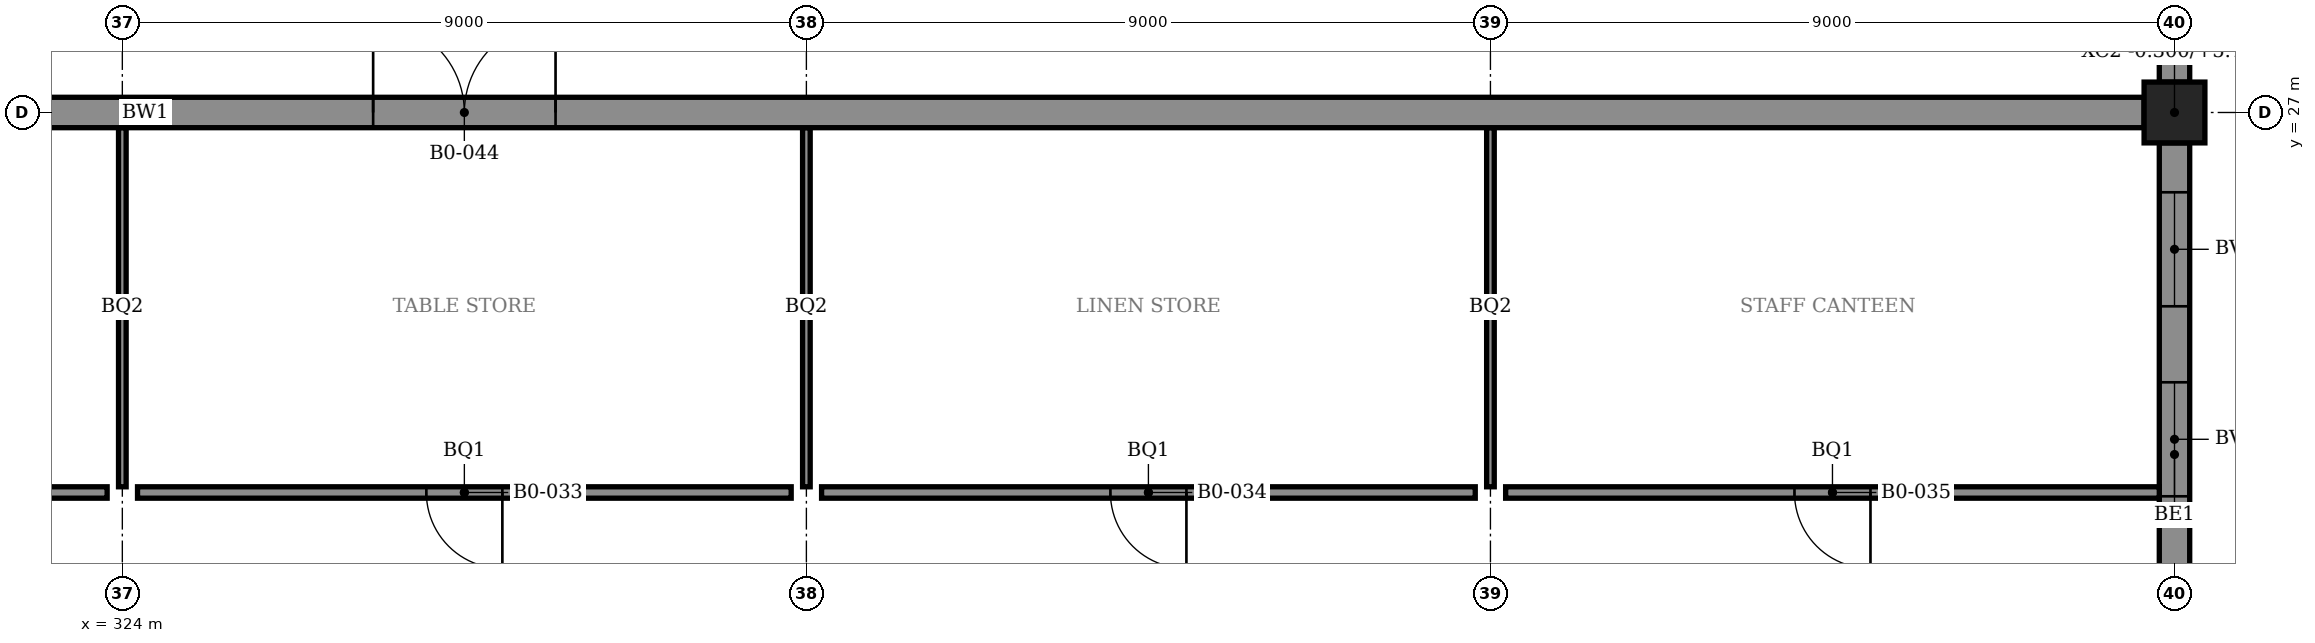
"""IFC4 building model, lengths in metres.
Left out: names, types, materials, properties, quantities, classifications, styles, units other than length and angle.
Written with IfcOpenShell. Run it as: python <this file> out.ifc"""

import sys

from ifc_helpers import new_model, si_unit, direction, frame, frame_2d, origin, origin_2d, place, context, subcontext, project, spatial, polyline, rectangle, outline, extrude, element, fill, save


model = new_model("IFC4")
c1 = context("Model", 3, precision=1e-05, world=origin(), true_north=direction((0.0, 1.0)))
c2 = subcontext(c1, "Body", "Model", "MODEL_VIEW")
j1 = project(units=[si_unit("LENGTHUNIT", "METRE"), si_unit("PLANEANGLEUNIT", "RADIAN")], contexts=[c1])
p1 = place(None, origin())
s1 = spatial("IfcSite", under=j1, at=p1, CompositionType="ELEMENT")
p2 = place(p1, origin())
s2 = spatial("IfcBuilding", under=s1, at=p2, CompositionType="ELEMENT")
p3 = place(p2, origin())
s3 = spatial("IfcBuildingStorey", under=s2, at=p3, CompositionType="ELEMENT", Elevation=0.0)
p4 = place(p3, frame((351.0, 27.0, -0.3), z_axis=(0.0, 0.0, 1.0), x_axis=(1.0, 0.0, 0.0)))
e1 = element("IfcColumn", 1, at=p4, inside=s3, PredefinedType="COLUMN", context=c2, shape_type="SweptSolid", body=[
    extrude(rectangle(XDim=0.8, YDim=0.8, at=origin_2d()), origin(), (0.0, 0.0, 1.0), 6.02),
])
p5 = place(p3, frame((288.4, 27.0, -0.3), z_axis=(0.0, 0.0, 1.0), x_axis=(1.0, 0.0, 0.0)))
e2 = element("IfcWall", 2, at=p5, inside=s3, PredefinedType="SHEAR", context=c2, shape_type="SweptSolid", body=[
    extrude(rectangle(XDim=62.2, YDim=0.4, at=frame_2d((31.1, 0.0))), origin(), (0.0, 0.0, 1.0), 10.625),
])
p6 = place(p5, frame((22.4, 0.0, 0.3)))
e3 = element("IfcOpeningElement", 3, at=p6, cuts=e2, PredefinedType="OPENING", context=c2, shape_type="SweptSolid", body=[
    extrude(rectangle(XDim=2.4, YDim=2.4, at=frame_2d((1.2, 1.2))), frame((0.0, 0.21, 0.0), z_axis=(0.0, -1.0, 0.0), x_axis=(1.0, 0.0, 0.0)), (0.0, 0.0, 1.0), 0.42),
])
p7 = place(p5, frame((38.9, 0.0, 0.3)))
e4 = element("IfcOpeningElement", 4, at=p7, cuts=e2, PredefinedType="OPENING", context=c2, shape_type="SweptSolid", body=[
    extrude(rectangle(XDim=2.4, YDim=2.4, at=frame_2d((1.2, 1.2))), frame((0.0, 0.21, 0.0), z_axis=(0.0, -1.0, 0.0), x_axis=(1.0, 0.0, 0.0)), (0.0, 0.0, 1.0), 0.42),
])
p8 = place(p3, frame((351.0, 27.4, 0.0), z_axis=(0.0, 0.0, 1.0), x_axis=(0.0, 1.0, 0.0)))
e5 = element("IfcWall", 5, at=p8, inside=s3, PredefinedType="STANDARD", context=c2, shape_type="SweptSolid", body=[
    extrude(outline(polyline([(0.0, 0.0), (35.2, 0.0), (35.2, 9.75), (35.5, 9.75), (35.5, 17.708), (0.0, 11.448), (0.0, 0.0)])), frame((0.0, 0.2, 0.0), z_axis=(0.0, -1.0, 0.0), x_axis=(1.0, 0.0, 0.0)), (0.0, 0.0, 1.0), 0.4),
])
p9 = place(p8, frame((2.75, 0.0, 0.0)))
e6 = element("IfcOpeningElement", 6, at=p9, cuts=e5, PredefinedType="OPENING", context=c2, shape_type="SweptSolid", body=[
    extrude(rectangle(XDim=2.7, YDim=2.4, at=frame_2d((1.35, 1.2))), frame((0.0, 0.21, 0.0), z_axis=(0.0, -1.0, 0.0), x_axis=(1.0, 0.0, 0.0)), (0.0, 0.0, 1.0), 0.42),
])
p10 = place(p8, frame((11.75, 0.0, 0.0)))
e7 = element("IfcOpeningElement", 7, at=p10, cuts=e5, PredefinedType="OPENING", context=c2, shape_type="SweptSolid", body=[
    extrude(rectangle(XDim=2.7, YDim=2.4, at=frame_2d((1.35, 1.2))), frame((0.0, 0.21, 0.0), z_axis=(0.0, -1.0, 0.0), x_axis=(1.0, 0.0, 0.0)), (0.0, 0.0, 1.0), 0.42),
])
p11 = place(p8, frame((20.75, 0.0, 0.0)))
e8 = element("IfcOpeningElement", 8, at=p11, cuts=e5, PredefinedType="OPENING", context=c2, shape_type="SweptSolid", body=[
    extrude(rectangle(XDim=2.7, YDim=2.4, at=frame_2d((1.35, 1.2))), frame((0.0, 0.21, 0.0), z_axis=(0.0, -1.0, 0.0), x_axis=(1.0, 0.0, 0.0)), (0.0, 0.0, 1.0), 0.42),
])
p12 = place(p8, frame((29.75, 0.0, 0.0)))
e9 = element("IfcOpeningElement", 9, at=p12, cuts=e5, PredefinedType="OPENING", context=c2, shape_type="SweptSolid", body=[
    extrude(rectangle(XDim=2.7, YDim=2.4, at=frame_2d((1.35, 1.2))), frame((0.0, 0.21, 0.0), z_axis=(0.0, -1.0, 0.0), x_axis=(1.0, 0.0, 0.0)), (0.0, 0.0, 1.0), 0.42),
])
p13 = place(p3, frame((351.0, 18.4, 0.0), z_axis=(0.0, 0.0, 1.0), x_axis=(0.0, 1.0, 0.0)))
e10 = element("IfcWall", 10, at=p13, inside=s3, PredefinedType="STANDARD", context=c2, shape_type="SweptSolid", body=[
    extrude(rectangle(XDim=8.2, YDim=0.4, at=frame_2d((4.1, 0.0))), origin(), (0.0, 0.0, 1.0), 5.02),
])
p14 = place(p13, frame((1.05, 0.0, 0.9)))
e11 = element("IfcOpeningElement", 11, at=p14, cuts=e10, PredefinedType="OPENING", context=c2, shape_type="SweptSolid", body=[
    extrude(rectangle(XDim=1.5, YDim=1.8, at=frame_2d((0.75, 0.9))), frame((0.0, 0.21, 0.0), z_axis=(0.0, -1.0, 0.0), x_axis=(1.0, 0.0, 0.0)), (0.0, 0.0, 1.0), 0.42),
])
p15 = place(p13, frame((3.55, 0.0, 0.9)))
e12 = element("IfcOpeningElement", 12, at=p15, cuts=e10, PredefinedType="OPENING", context=c2, shape_type="SweptSolid", body=[
    extrude(rectangle(XDim=1.5, YDim=1.8, at=frame_2d((0.75, 0.9))), frame((0.0, 0.21, 0.0), z_axis=(0.0, -1.0, 0.0), x_axis=(1.0, 0.0, 0.0)), (0.0, 0.0, 1.0), 0.42),
])
p16 = place(p13, frame((6.05, 0.0, 0.9)))
e13 = element("IfcOpeningElement", 13, at=p16, cuts=e10, PredefinedType="OPENING", context=c2, shape_type="SweptSolid", body=[
    extrude(rectangle(XDim=1.5, YDim=1.8, at=frame_2d((0.75, 0.9))), frame((0.0, 0.21, 0.0), z_axis=(0.0, -1.0, 0.0), x_axis=(1.0, 0.0, 0.0)), (0.0, 0.0, 1.0), 0.42),
])
p17 = place(p3, frame((315.2, 22.0, 0.0), z_axis=(0.0, 0.0, 1.0), x_axis=(1.0, 0.0, 0.0)))
e14 = element("IfcWall", 14, at=p17, inside=s3, PredefinedType="PARTITIONING", context=c2, shape_type="SweptSolid", body=[
    extrude(rectangle(XDim=8.6, YDim=0.15, at=frame_2d((4.3, 0.0))), origin(), (0.0, 0.0, 1.0), 5.72),
])
p18 = place(p3, frame((324.2, 22.0, 0.0), z_axis=(0.0, 0.0, 1.0), x_axis=(1.0, 0.0, 0.0)))
e15 = element("IfcWall", 15, at=p18, inside=s3, PredefinedType="PARTITIONING", context=c2, shape_type="SweptSolid", body=[
    extrude(rectangle(XDim=8.6, YDim=0.15, at=frame_2d((4.3, 0.0))), origin(), (0.0, 0.0, 1.0), 5.72),
])
p19 = place(p18, frame((3.8, 0.0, 0.0)))
e16 = element("IfcOpeningElement", 16, at=p19, cuts=e15, PredefinedType="OPENING", context=c2, shape_type="SweptSolid", body=[
    extrude(rectangle(XDim=1.0, YDim=2.4, at=frame_2d((0.5, 1.2))), frame((0.0, 0.085, 0.0), z_axis=(0.0, -1.0, 0.0), x_axis=(1.0, 0.0, 0.0)), (0.0, 0.0, 1.0), 0.17),
])
p20 = place(p3, frame((333.2, 22.0, 0.0), z_axis=(0.0, 0.0, 1.0), x_axis=(1.0, 0.0, 0.0)))
e17 = element("IfcWall", 17, at=p20, inside=s3, PredefinedType="PARTITIONING", context=c2, shape_type="SweptSolid", body=[
    extrude(rectangle(XDim=8.6, YDim=0.15, at=frame_2d((4.3, 0.0))), origin(), (0.0, 0.0, 1.0), 5.72),
])
p21 = place(p20, frame((3.8, 0.0, 0.0)))
e18 = element("IfcOpeningElement", 18, at=p21, cuts=e17, PredefinedType="OPENING", context=c2, shape_type="SweptSolid", body=[
    extrude(rectangle(XDim=1.0, YDim=2.4, at=frame_2d((0.5, 1.2))), frame((0.0, 0.085, 0.0), z_axis=(0.0, -1.0, 0.0), x_axis=(1.0, 0.0, 0.0)), (0.0, 0.0, 1.0), 0.17),
])
p22 = place(p3, frame((342.2, 22.0, 0.0), z_axis=(0.0, 0.0, 1.0), x_axis=(1.0, 0.0, 0.0)))
e19 = element("IfcWall", 19, at=p22, inside=s3, PredefinedType="PARTITIONING", context=c2, shape_type="SweptSolid", body=[
    extrude(rectangle(XDim=8.6, YDim=0.15, at=frame_2d((4.3, 0.0))), origin(), (0.0, 0.0, 1.0), 5.72),
])
p23 = place(p22, frame((3.8, 0.0, 0.0)))
e20 = element("IfcOpeningElement", 20, at=p23, cuts=e19, PredefinedType="OPENING", context=c2, shape_type="SweptSolid", body=[
    extrude(rectangle(XDim=1.0, YDim=2.4, at=frame_2d((0.5, 1.2))), frame((0.0, 0.085, 0.0), z_axis=(0.0, -1.0, 0.0), x_axis=(1.0, 0.0, 0.0)), (0.0, 0.0, 1.0), 0.17),
])
for number, where, z_axis, x_axis in (
    (21, (324.0, 22.075, 0.0), (0.0, 0.0, 1.0), (0.0, 1.0, 0.0)),
    (22, (333.0, 22.075, 0.0), (0.0, 0.0, 1.0), (0.0, 1.0, 0.0)),
    (23, (342.0, 22.075, 0.0), (0.0, 0.0, 1.0), (0.0, 1.0, 0.0)),
):
    element("IfcWall", number, at=place(p3, frame(where, z_axis=z_axis, x_axis=x_axis)), inside=s3, PredefinedType="PARTITIONING", context=c2, shape_type="SweptSolid", body=[
        extrude(rectangle(XDim=4.725, YDim=0.1, at=frame_2d((2.363, 0.0))), origin(), (0.0, 0.0, 1.0), 5.02),
    ])
p24 = place(p15, origin())
e24 = element("IfcWindow", 24, at=p24, inside=s3, PartitioningType="SINGLE_PANEL", PredefinedType="WINDOW", context=c2, shape_type="SweptSolid", body=[
    extrude(rectangle(XDim=1.5, YDim=1.8, at=frame_2d((0.75, 0.9))), frame((0.0, 0.03, 0.0), z_axis=(0.0, -1.0, 0.0), x_axis=(1.0, 0.0, 0.0)), (0.0, 0.0, 1.0), 0.06),
])
fill(e12, e24)
p25 = place(p16, origin())
e25 = element("IfcWindow", 25, at=p25, inside=s3, PartitioningType="SINGLE_PANEL", PredefinedType="WINDOW", context=c2, shape_type="SweptSolid", body=[
    extrude(rectangle(XDim=1.5, YDim=1.8, at=frame_2d((0.75, 0.9))), frame((0.0, 0.03, 0.0), z_axis=(0.0, -1.0, 0.0), x_axis=(1.0, 0.0, 0.0)), (0.0, 0.0, 1.0), 0.06),
])
fill(e13, e25)
p26 = place(p19, frame((1.0, 0.0, 0.0), z_axis=(0.0, 0.0, 1.0), x_axis=(-1.0, 0.0, 0.0)))
e26 = element("IfcDoor", 26, at=p26, inside=s3, OperationType="SINGLE_SWING_RIGHT", PredefinedType="DOOR", context=c2, shape_type="SweptSolid", body=[
    extrude(rectangle(XDim=1.0, YDim=2.4, at=frame_2d((0.5, 1.2))), frame((0.0, 0.025, 0.0), z_axis=(0.0, -1.0, 0.0), x_axis=(1.0, 0.0, 0.0)), (0.0, 0.0, 1.0), 0.05),
])
fill(e16, e26)
p27 = place(p21, frame((1.0, 0.0, 0.0), z_axis=(0.0, 0.0, 1.0), x_axis=(-1.0, 0.0, 0.0)))
e27 = element("IfcDoor", 27, at=p27, inside=s3, OperationType="SINGLE_SWING_RIGHT", PredefinedType="DOOR", context=c2, shape_type="SweptSolid", body=[
    extrude(rectangle(XDim=1.0, YDim=2.4, at=frame_2d((0.5, 1.2))), frame((0.0, 0.025, 0.0), z_axis=(0.0, -1.0, 0.0), x_axis=(1.0, 0.0, 0.0)), (0.0, 0.0, 1.0), 0.05),
])
fill(e18, e27)
p28 = place(p23, frame((1.0, 0.0, 0.0), z_axis=(0.0, 0.0, 1.0), x_axis=(-1.0, 0.0, 0.0)))
e28 = element("IfcDoor", 28, at=p28, inside=s3, OperationType="SINGLE_SWING_RIGHT", PredefinedType="DOOR", context=c2, shape_type="SweptSolid", body=[
    extrude(rectangle(XDim=1.0, YDim=2.4, at=frame_2d((0.5, 1.2))), frame((0.0, 0.025, 0.0), z_axis=(0.0, -1.0, 0.0), x_axis=(1.0, 0.0, 0.0)), (0.0, 0.0, 1.0), 0.05),
])
fill(e20, e28)
p29 = place(p7, origin())
e29 = element("IfcDoor", 29, at=p29, inside=s3, OperationType="DOUBLE_DOOR_SINGLE_SWING", PredefinedType="DOOR", context=c2, shape_type="SweptSolid", body=[
    extrude(rectangle(XDim=2.4, YDim=2.4, at=frame_2d((1.2, 1.2))), frame((0.0, 0.025, 0.0), z_axis=(0.0, -1.0, 0.0), x_axis=(1.0, 0.0, 0.0)), (0.0, 0.0, 1.0), 0.05),
])
fill(e4, e29)
save(model, sys.argv[1])
